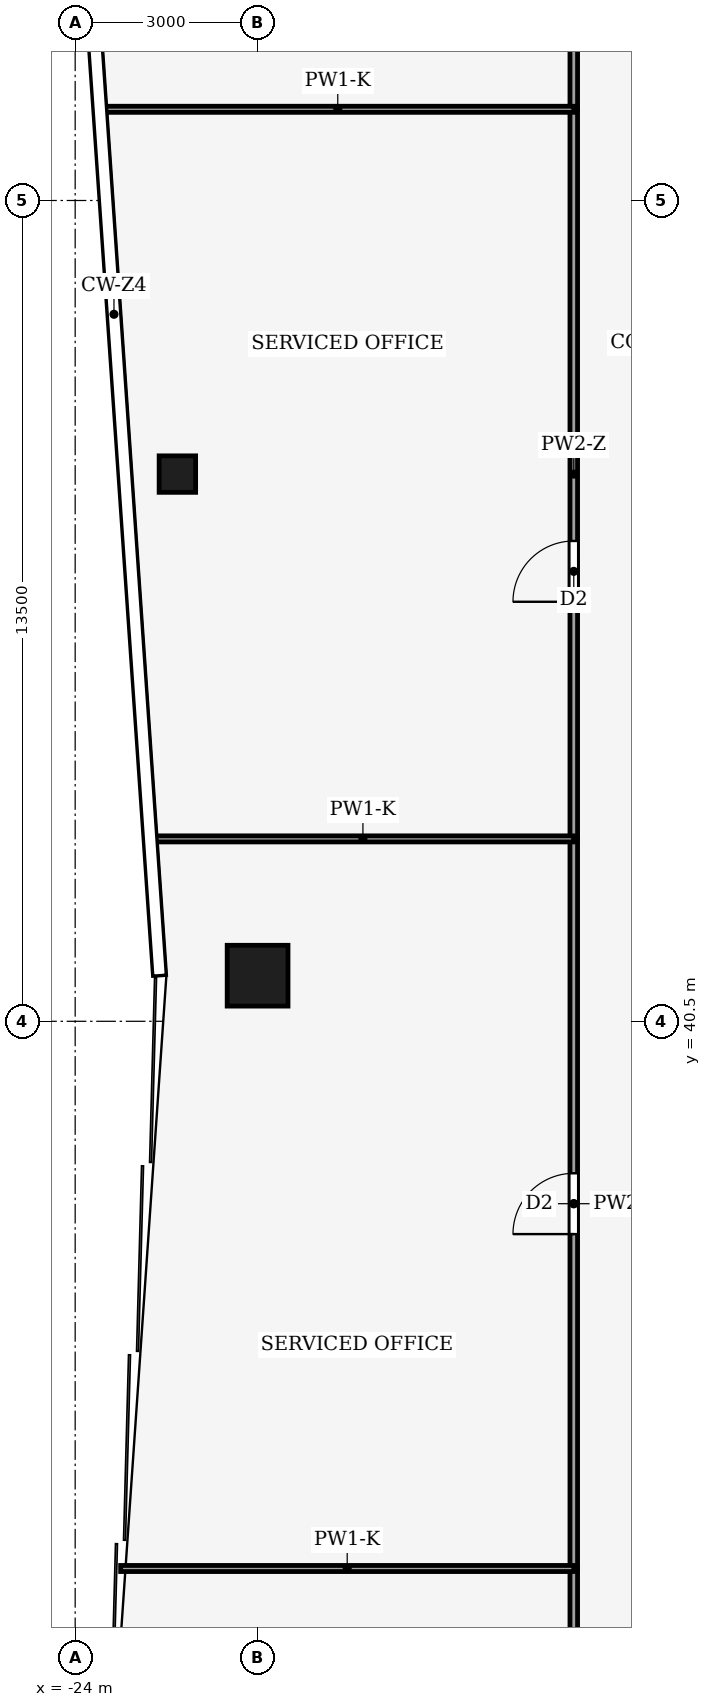
"""IFC4 building model, lengths in metres.
Left out: names, types, materials, properties, quantities, classifications, styles, units other than length and angle.
Written with IfcOpenShell. Run it as: python <this file> out.ifc"""

import sys

from ifc_helpers import new_model, si_unit, direction, frame, frame_2d, origin, origin_2d, place, context, subcontext, project, spatial, rectangle, hollow_rectangle, extrude, element, fill, save


model = new_model("IFC4")
c1 = context("Model", 3, precision=1e-05, world=origin(), true_north=direction((0.0, 1.0)))
c2 = subcontext(c1, "Body", "Model", "MODEL_VIEW")
j1 = project(units=[si_unit("LENGTHUNIT", "METRE"), si_unit("PLANEANGLEUNIT", "RADIAN")], contexts=[c1])
p1 = place(None, origin())
s1 = spatial("IfcSite", under=j1, at=p1, CompositionType="ELEMENT")
p2 = place(p1, origin())
s2 = spatial("IfcBuilding", under=s1, at=p2, CompositionType="ELEMENT")
p3 = place(p2, frame((0.0, 0.0, 278.0)))
s3 = spatial("IfcBuildingStorey", under=s2, at=p3, CompositionType="ELEMENT", Elevation=278.0)
p4 = place(p3, frame((-21.0, 41.25, 0.0), z_axis=(0.0, 0.0, 1.0), x_axis=(1.0, 0.0, 0.0)))
e1 = element("IfcColumn", 1, at=p4, inside=s3, PredefinedType="COLUMN", context=c2, shape_type="SweptSolid", body=[
    extrude(hollow_rectangle(XDim=1.0, YDim=1.0, WallThickness=0.045, at=origin_2d()), origin(), (0.0, 0.0, 1.0), 4.0),
])
p5 = place(p3, frame((-22.319, 49.5, 0.0), z_axis=(0.0, 0.0, 1.0), x_axis=(1.0, 0.0, 0.0)))
e2 = element("IfcColumn", 2, at=p5, inside=s3, PredefinedType="COLUMN", context=c2, shape_type="SweptSolid", body=[
    extrude(hollow_rectangle(XDim=0.6, YDim=0.6, WallThickness=0.025, at=origin_2d()), origin(), (0.0, 0.0, 1.0), 4.0),
])
p6 = place(p3, frame((-15.8, 28.5, 0.0), z_axis=(0.0, 0.0, 1.0), x_axis=(0.0, 1.0, 0.0)))
e3 = element("IfcWall", 3, at=p6, inside=s3, PredefinedType="PARTITIONING", context=c2, shape_type="SweptSolid", body=[
    extrude(rectangle(XDim=3.0, YDim=0.125, at=frame_2d((1.5, 0.0))), origin(), (0.0, 0.0, 1.0), 3.75),
])
p7 = place(p6, frame((1.05, 0.0, 0.0)))
e4 = element("IfcOpeningElement", 4, at=p7, cuts=e3, PredefinedType="OPENING", context=c2, shape_type="SweptSolid", body=[
    extrude(rectangle(XDim=0.9, YDim=2.1, at=frame_2d((0.45, 1.05))), frame((0.0, 0.073, 0.0), z_axis=(0.0, -1.0, 0.0), x_axis=(1.0, 0.0, 0.0)), (0.0, 0.0, 1.0), 0.145),
])
p8 = place(p3, frame((-15.8, 31.5, 0.0), z_axis=(0.0, 0.0, 1.0), x_axis=(0.0, 1.0, 0.0)))
e5 = element("IfcWall", 5, at=p8, inside=s3, PredefinedType="PARTITIONING", context=c2, shape_type="SweptSolid", body=[
    extrude(rectangle(XDim=12.0, YDim=0.125, at=frame_2d((6.0, 0.0))), origin(), (0.0, 0.0, 1.0), 3.02),
])
p9 = place(p8, frame((5.5, 0.0, 0.0)))
e6 = element("IfcOpeningElement", 6, at=p9, cuts=e5, PredefinedType="OPENING", context=c2, shape_type="SweptSolid", body=[
    extrude(rectangle(XDim=1.0, YDim=2.1, at=frame_2d((0.5, 1.05))), frame((0.0, 0.073, 0.0), z_axis=(0.0, -1.0, 0.0), x_axis=(1.0, 0.0, 0.0)), (0.0, 0.0, 1.0), 0.145),
])
p10 = place(p3, frame((-15.8, 43.5, 0.0), z_axis=(0.0, 0.0, 1.0), x_axis=(0.0, 1.0, 0.0)))
e7 = element("IfcWall", 7, at=p10, inside=s3, PredefinedType="PARTITIONING", context=c2, shape_type="SweptSolid", body=[
    extrude(rectangle(XDim=12.0, YDim=0.125, at=frame_2d((6.0, 0.0))), origin(), (0.0, 0.0, 1.0), 3.12),
])
p11 = place(p10, frame((3.9, 0.0, 0.0)))
e8 = element("IfcOpeningElement", 8, at=p11, cuts=e7, PredefinedType="OPENING", context=c2, shape_type="SweptSolid", body=[
    extrude(rectangle(XDim=1.0, YDim=2.1, at=frame_2d((0.5, 1.05))), frame((0.0, 0.073, 0.0), z_axis=(0.0, -1.0, 0.0), x_axis=(1.0, 0.0, 0.0)), (0.0, 0.0, 1.0), 0.145),
])
p12 = place(p3, frame((-15.8, 55.5, 0.0), z_axis=(0.0, 0.0, 1.0), x_axis=(0.0, 1.0, 0.0)))
e9 = element("IfcWall", 9, at=p12, inside=s3, PredefinedType="PARTITIONING", context=c2, shape_type="SweptSolid", body=[
    extrude(rectangle(XDim=13.397, YDim=0.125, at=frame_2d((6.698, 0.0))), origin(), (0.0, 0.0, 1.0), 2.92),
])
p13 = place(p12, frame((6.133, 0.0, 0.0)))
e10 = element("IfcOpeningElement", 10, at=p13, cuts=e9, PredefinedType="OPENING", context=c2, shape_type="SweptSolid", body=[
    extrude(rectangle(XDim=1.0, YDim=2.1, at=frame_2d((0.5, 1.05))), frame((0.0, 0.073, 0.0), z_axis=(0.0, -1.0, 0.0), x_axis=(1.0, 0.0, 0.0)), (0.0, 0.0, 1.0), 0.145),
])
p14 = place(p3, frame((-15.8, 31.5, 0.0), z_axis=(0.0, 0.0, 1.0), x_axis=(-1.0, 0.0, 0.0)))
e11 = element("IfcWall", 11, at=p14, inside=s3, PredefinedType="PARTITIONING", context=c2, shape_type="SweptSolid", body=[
    extrude(rectangle(XDim=7.452, YDim=0.1, at=frame_2d((3.726, 0.0))), origin(), (0.0, 0.0, 1.0), 2.92),
])
p15 = place(p3, frame((-15.8, 43.5, 0.0), z_axis=(0.0, 0.0, 1.0), x_axis=(-1.0, 0.0, 0.0)))
e12 = element("IfcWall", 12, at=p15, inside=s3, PredefinedType="PARTITIONING", context=c2, shape_type="SweptSolid", body=[
    extrude(rectangle(XDim=6.935, YDim=0.1, at=frame_2d((3.468, 0.0))), origin(), (0.0, 0.0, 1.0), 2.92),
])
p16 = place(p3, frame((-15.8, 55.5, 0.0), z_axis=(0.0, 0.0, 1.0), x_axis=(-1.0, 0.0, 0.0)))
e13 = element("IfcWall", 13, at=p16, inside=s3, PredefinedType="PARTITIONING", context=c2, shape_type="SweptSolid", body=[
    extrude(rectangle(XDim=7.763, YDim=0.1, at=frame_2d((3.881, 0.0))), origin(), (0.0, 0.0, 1.0), 2.92),
])
p17 = place(p9, origin())
e14 = element("IfcDoor", 14, at=p17, inside=s3, OperationType="SINGLE_SWING_LEFT", PredefinedType="DOOR", context=c2, shape_type="SweptSolid", body=[
    extrude(rectangle(XDim=1.0, YDim=2.1, at=frame_2d((0.5, 1.05))), frame((0.0, 0.025, 0.0), z_axis=(0.0, -1.0, 0.0), x_axis=(1.0, 0.0, 0.0)), (0.0, 0.0, 1.0), 0.05),
])
fill(e6, e14)
p18 = place(p11, origin())
e15 = element("IfcDoor", 15, at=p18, inside=s3, OperationType="SINGLE_SWING_LEFT", PredefinedType="DOOR", context=c2, shape_type="SweptSolid", body=[
    extrude(rectangle(XDim=1.0, YDim=2.1, at=frame_2d((0.5, 1.05))), frame((0.0, 0.025, 0.0), z_axis=(0.0, -1.0, 0.0), x_axis=(1.0, 0.0, 0.0)), (0.0, 0.0, 1.0), 0.05),
])
fill(e8, e15)
save(model, sys.argv[1])
